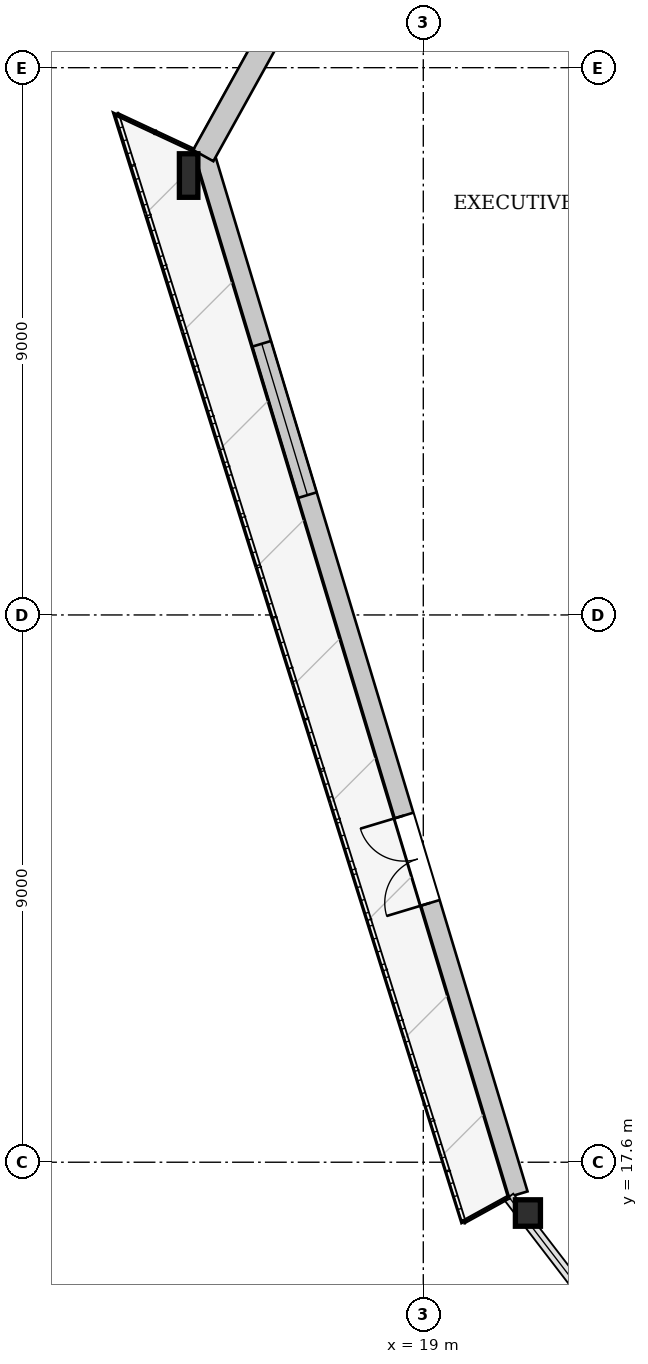
"""IFC4 building model, lengths in metres.
Left out: names, types, materials, properties, quantities, classifications, styles, units other than length and angle.
Written with IfcOpenShell. Run it as: python <this file> out.ifc"""

import sys

from ifc_helpers import new_model, si_unit, direction, frame, frame_2d, origin, origin_2d, place, context, subcontext, project, spatial, rectangle, i_section, extrude, source, transform, mapped, element, fill, save


model = new_model("IFC4")
c1 = context("Model", 3, precision=1e-05, world=origin(), true_north=direction((0.0, 1.0)))
c2 = subcontext(c1, "Body", "Model", "MODEL_VIEW")
j1 = project(units=[si_unit("LENGTHUNIT", "METRE"), si_unit("PLANEANGLEUNIT", "RADIAN")], contexts=[c1])
p1 = place(None, origin())
s1 = spatial("IfcSite", under=j1, at=p1, CompositionType="ELEMENT")
p2 = place(p1, origin())
s2 = spatial("IfcBuilding", under=s1, at=p2, CompositionType="ELEMENT")
p3 = place(p2, frame((0.0, 0.0, 157.25)))
s3 = spatial("IfcBuildingStorey", under=s2, at=p3, CompositionType="ELEMENT", Elevation=157.25)
m1 = source(origin(), c2, "Body", "SweptSolid", [
    extrude(i_section(OverallWidth=0.304, OverallDepth=0.716, WebThickness=0.021, FlangeThickness=0.04, at=origin_2d()), origin(), (0.0, 0.0, 1.0), 3.49),
])
p4 = place(p3, frame((15.215, 34.246, 0.0), z_axis=(-0.04266501915, -0.240322960326, 0.969754902479), x_axis=(0.984604180574, -0.17479876314, 0.0)))
e1 = element("IfcColumn", 1, at=p4, inside=s3, PredefinedType="COLUMN", context=c2, shape_type="MappedRepresentation", body=[
    mapped(m1, transform((0.0, 0.0, 0.0), x_axis=(1.0, 0.0, 0.0), y_axis=(0.0, 1.0, 0.0), z_axis=(0.0, 0.0, 1.0), scale=1.0)),
])
m2 = source(origin(), c2, "Body", "SweptSolid", [
    extrude(i_section(OverallWidth=0.412, OverallDepth=0.435, WebThickness=0.031, FlangeThickness=0.05, at=origin_2d()), origin(), (0.0, 0.0, 1.0), 3.482),
])
p5 = place(p3, frame((20.408, 17.028, 0.0), z_axis=(0.17948419907, -0.151089237889, 0.972089226603), x_axis=(0.643997697905, 0.765027427674, 0.0)))
e2 = element("IfcColumn", 2, at=p5, inside=s3, PredefinedType="COLUMN", context=c2, shape_type="MappedRepresentation", body=[
    mapped(m2, transform((0.0, 0.0, 0.0), x_axis=(1.0, 0.0, 0.0), y_axis=(0.0, 1.0, 0.0), z_axis=(0.0, 0.0, 1.0), scale=1.0)),
])
p6 = place(p3, frame((20.561, 17.074, 0.0), z_axis=(0.0, 0.0, 1.0), x_axis=(-0.288764905174, 0.957400036317, 0.0)))
e3 = element("IfcWall", 3, at=p6, inside=s3, PredefinedType="SOLIDWALL", context=c2, shape_type="SweptSolid", body=[
    extrude(rectangle(XDim=17.984, YDim=0.32, at=frame_2d((8.992, 0.0))), origin(), (0.0, 0.0, 1.0), 2.722),
])
p7 = place(p6, frame((5.005, 0.0, 0.0)))
e4 = element("IfcOpeningElement", 4, at=p7, cuts=e3, PredefinedType="OPENING", context=c2, shape_type="SweptSolid", body=[
    extrude(rectangle(XDim=1.5, YDim=2.3, at=frame_2d((0.75, 1.15))), frame((0.0, 0.17, 0.0), z_axis=(0.0, -1.0, 0.0), x_axis=(1.0, 0.0, 0.0)), (0.0, 0.0, 1.0), 0.34),
])
p8 = place(p6, frame((12.008, 0.0, 0.252)))
e5 = element("IfcOpeningElement", 5, at=p8, cuts=e3, PredefinedType="OPENING", context=c2, shape_type="SweptSolid", body=[
    extrude(rectangle(XDim=2.6, YDim=2.35, at=frame_2d((1.3, 1.175))), frame((0.0, 0.17, 0.0), z_axis=(0.0, -1.0, 0.0), x_axis=(1.0, 0.0, 0.0)), (0.0, 0.0, 1.0), 0.34),
])
p9 = place(p3, frame((15.381, 34.154, 0.0), z_axis=(0.0, 0.0, 1.0), x_axis=(0.484802227824, 0.874623804785, 0.0)))
e6 = element("IfcWall", 6, at=p9, inside=s3, PredefinedType="SOLIDWALL", context=c2, shape_type="SweptSolid", body=[
    extrude(rectangle(XDim=4.933, YDim=0.38, at=frame_2d((2.466, 0.0))), origin(), (0.0, 0.0, 1.0), 2.722),
])
m3 = source(origin(), c2, "Body", "SweptSolid", [
    extrude(rectangle(XDim=1.5, YDim=2.3, at=frame_2d((0.75, 1.15))), frame((0.0, 0.025, 0.0), z_axis=(0.0, -1.0, 0.0), x_axis=(1.0, 0.0, 0.0)), (0.0, 0.0, 1.0), 0.05),
])
p10 = place(p7, origin())
e7 = element("IfcDoor", 7, at=p10, inside=s3, OperationType="DOUBLE_DOOR_SINGLE_SWING", PredefinedType="DOOR", context=c2, shape_type="MappedRepresentation", body=[
    mapped(m3, transform((0.0, 0.0, 0.0), x_axis=(1.0, 0.0, 0.0), y_axis=(0.0, 1.0, 0.0), z_axis=(0.0, 0.0, 1.0), scale=1.0)),
])
fill(e4, e7)
m4 = source(origin(), c2, "Body", "SweptSolid", [
    extrude(rectangle(XDim=2.6, YDim=2.35, at=frame_2d((1.3, 1.175))), frame((0.0, 0.03, 0.0), z_axis=(0.0, -1.0, 0.0), x_axis=(1.0, 0.0, 0.0)), (0.0, 0.0, 1.0), 0.06),
])
p11 = place(p8, origin())
e8 = element("IfcWindow", 8, at=p11, inside=s3, PartitioningType="SINGLE_PANEL", PredefinedType="WINDOW", context=c2, shape_type="MappedRepresentation", body=[
    mapped(m4, transform((0.0, 0.0, 0.0), x_axis=(1.0, 0.0, 0.0), y_axis=(0.0, 1.0, 0.0), z_axis=(0.0, 0.0, 1.0), scale=1.0)),
])
fill(e5, e8)
save(model, sys.argv[1])
